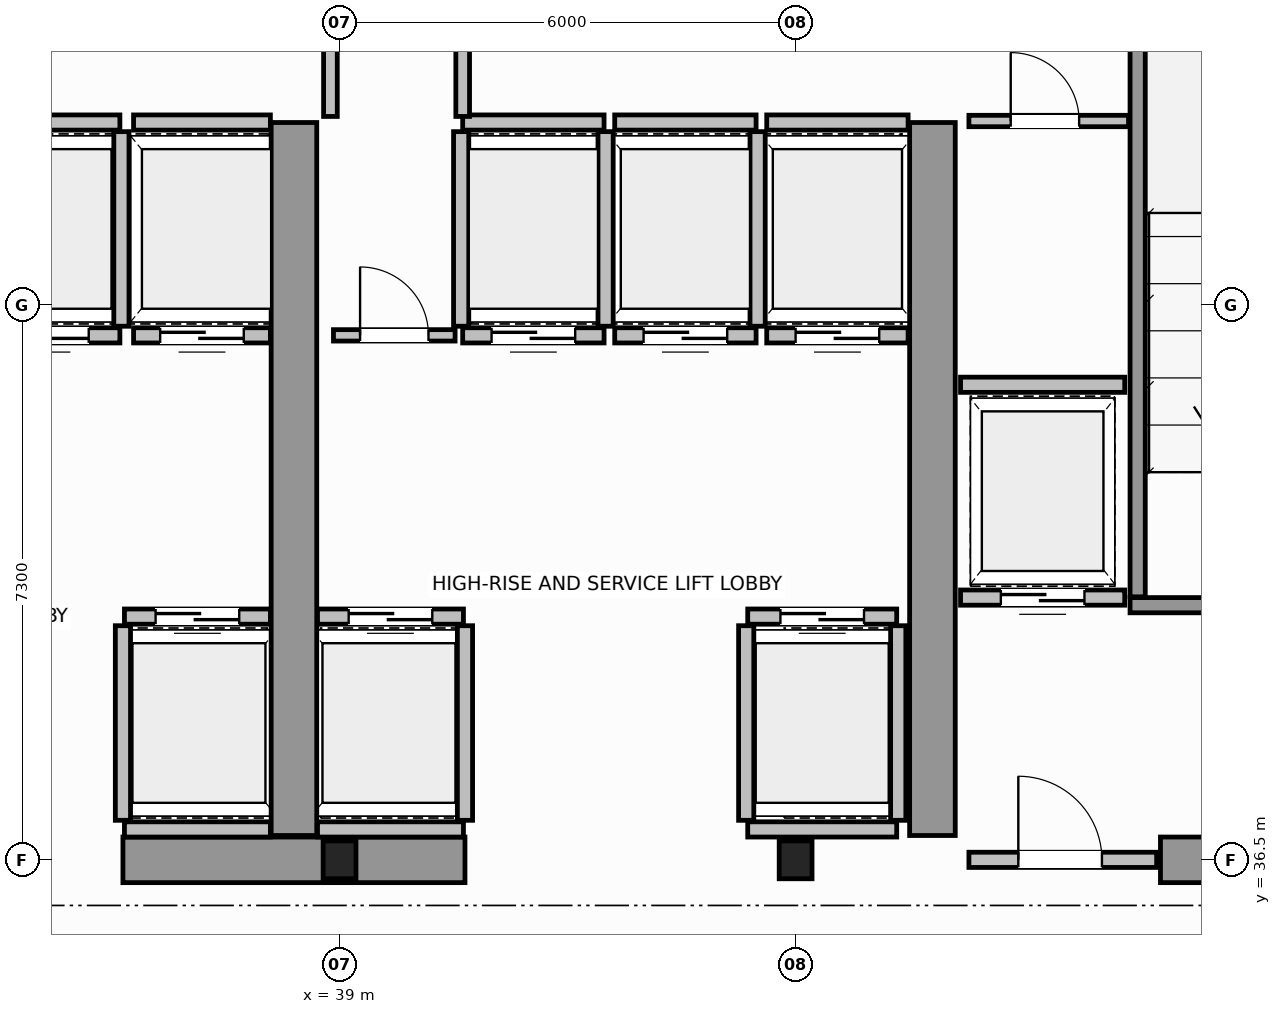
"""IFC4 building model, lengths in metres.
Left out: names, types, materials, properties, quantities, classifications, styles, units other than length and angle.
Written with IfcOpenShell. Run it as: python <this file> out.ifc"""

import sys

from ifc_helpers import new_model, si_unit, direction, frame, frame_2d, origin, origin_2d, place, context, subcontext, project, spatial, rectangle, i_section, extrude, source, transform, mapped, element, fill, save


model = new_model("IFC4")
c1 = context("Model", 3, precision=1e-05, world=origin(), true_north=direction((0.0, 1.0)))
c2 = subcontext(c1, "Body", "Model", "MODEL_VIEW")
j1 = project(units=[si_unit("LENGTHUNIT", "METRE"), si_unit("PLANEANGLEUNIT", "RADIAN")], contexts=[c1])
p1 = place(None, origin())
s1 = spatial("IfcSite", under=j1, at=p1, CompositionType="ELEMENT")
p2 = place(p1, origin())
s2 = spatial("IfcBuilding", under=s1, at=p2, CompositionType="ELEMENT")
p3 = place(p2, frame((0.0, 0.0, 199.4)))
s3 = spatial("IfcBuildingStorey", under=s2, at=p3, CompositionType="ELEMENT", Elevation=199.4)
m1 = source(origin(), c2, "Body", "SweptSolid", [
    extrude(i_section(OverallWidth=0.432, OverallDepth=0.498, WebThickness=0.055, FlangeThickness=0.068, FilletRadius=0.015, at=origin_2d()), origin(), (0.0, 0.0, 1.0), 3.8),
])
for number, where, z_axis, x_axis in (
    (1, (39.0, 36.5, 0.0), (0.0, 0.0, 1.0), (1.0, 0.0, 0.0)),
    (2, (45.0, 36.5, 0.0), (0.0, 0.0, 1.0), (1.0, 0.0, 0.0)),
):
    element("IfcColumn", number, at=place(p3, frame(where, z_axis=z_axis, x_axis=x_axis)), inside=s3, PredefinedType="COLUMN", context=c2, shape_type="MappedRepresentation", body=[
        mapped(m1, transform((0.0, 0.0, 0.0), scale=1.0)),
    ])
p4 = place(p3, frame((36.15, 36.5, 0.0), z_axis=(0.0, 0.0, 1.0), x_axis=(1.0, 0.0, 0.0)))
e3 = element("IfcWall", 3, at=p4, inside=s3, PredefinedType="SHEAR", context=c2, shape_type="SweptSolid", body=[
    extrude(rectangle(XDim=4.5, YDim=0.6, at=frame_2d((2.25, 0.0))), origin(), (0.0, 0.0, 1.0), 3.8),
])
p5 = place(p3, frame((49.8, 36.5, 0.0), z_axis=(0.0, 0.0, 1.0), x_axis=(1.0, 0.0, 0.0)))
e4 = element("IfcWall", 4, at=p5, inside=s3, PredefinedType="SHEAR", context=c2, shape_type="SweptSolid", body=[
    extrude(rectangle(XDim=3.88, YDim=0.6, at=frame_2d((1.94, 0.0))), origin(), (0.0, 0.0, 1.0), 2.58),
])
for number, where, z_axis, x_axis in (
    (5, (38.4, 36.82, 0.0), (0.0, 0.0, 1.0), (0.0, 1.0, 0.0)),
    (6, (46.8, 36.82, 0.0), (0.0, 0.0, 1.0), (0.0, 1.0, 0.0)),
):
    element("IfcWall", number, at=place(p3, frame(where, z_axis=z_axis, x_axis=x_axis)), inside=s3, PredefinedType="SHEAR", context=c2, shape_type="SweptSolid", body=[
        extrude(rectangle(XDim=9.38, YDim=0.6, at=frame_2d((4.69, 0.0))), origin(), (0.0, 0.0, 1.0), 3.8),
    ])
p6 = place(p3, frame((49.4, 39.85, 0.0), z_axis=(0.0, 0.0, 1.0), x_axis=(1.0, 0.0, 0.0)))
e7 = element("IfcWall", 7, at=p6, inside=s3, PredefinedType="SOLIDWALL", context=c2, shape_type="SweptSolid", body=[
    extrude(rectangle(XDim=4.3, YDim=0.2, at=frame_2d((2.15, 0.0))), origin(), (0.0, 0.0, 1.0), 3.8),
])
p7 = place(p6, frame((1.325, 0.0, 0.0)))
e8 = element("IfcOpeningElement", 8, at=p7, cuts=e7, PredefinedType="OPENING", context=c2, shape_type="SweptSolid", body=[
    extrude(rectangle(XDim=1.1, YDim=2.15, at=frame_2d((0.55, 1.075))), frame((0.0, 0.11, 0.0), z_axis=(0.0, -1.0, 0.0), x_axis=(1.0, 0.0, 0.0)), (0.0, 0.0, 1.0), 0.22),
])
p8 = place(p3, frame((49.5, 39.96, 0.0), z_axis=(0.0, 0.0, 1.0), x_axis=(0.0, 1.0, 0.0)))
e9 = element("IfcWall", 9, at=p8, inside=s3, PredefinedType="SOLIDWALL", context=c2, shape_type="SweptSolid", body=[
    extrude(rectangle(XDim=9.93, YDim=0.2, at=frame_2d((4.965, 0.0))), origin(), (0.0, 0.0, 1.0), 3.8),
])
p9 = place(p3, frame((47.28, 36.5, 0.0), z_axis=(0.0, 0.0, 1.0), x_axis=(1.0, 0.0, 0.0)))
e10 = element("IfcWall", 10, at=p9, inside=s3, PredefinedType="SOLIDWALL", context=c2, shape_type="SweptSolid", body=[
    extrude(rectangle(XDim=2.47, YDim=0.2, at=frame_2d((1.235, 0.0))), origin(), (0.0, 0.0, 1.0), 2.57),
])
p10 = place(p9, frame((0.65, 0.0, 0.0)))
e11 = element("IfcOpeningElement", 11, at=p10, cuts=e10, PredefinedType="OPENING", context=c2, shape_type="SweptSolid", body=[
    extrude(rectangle(XDim=1.1, YDim=2.15, at=frame_2d((0.55, 1.075))), frame((0.0, 0.11, 0.0), z_axis=(0.0, -1.0, 0.0), x_axis=(1.0, 0.0, 0.0)), (0.0, 0.0, 1.0), 0.22),
])
p11 = place(p3, frame((36.17, 39.7, 0.0), z_axis=(0.0, 0.0, 1.0), x_axis=(1.0, 0.0, 0.0)))
e12 = element("IfcWall", 12, at=p11, inside=s3, PredefinedType="SOLIDWALL", context=c2, shape_type="SweptSolid", body=[
    extrude(rectangle(XDim=1.92, YDim=0.2, at=frame_2d((0.96, 0.0))), origin(), (0.0, 0.0, 1.0), 3.58),
])
p12 = place(p11, frame((0.41, 0.0, 0.0)))
e13 = element("IfcOpeningElement", 13, at=p12, cuts=e12, PredefinedType="OPENING", context=c2, shape_type="SweptSolid", body=[
    extrude(rectangle(XDim=1.1, YDim=2.15, at=frame_2d((0.55, 1.075))), frame((0.0, 0.11, 0.0), z_axis=(0.0, -1.0, 0.0), x_axis=(1.0, 0.0, 0.0)), (0.0, 0.0, 1.0), 0.22),
])
p13 = place(p3, frame((36.17, 36.9, 0.0), z_axis=(0.0, 0.0, 1.0), x_axis=(1.0, 0.0, 0.0)))
e14 = element("IfcWall", 14, at=p13, inside=s3, PredefinedType="SOLIDWALL", context=c2, shape_type="SweptSolid", body=[
    extrude(rectangle(XDim=1.92, YDim=0.2, at=frame_2d((0.96, 0.0))), origin(), (0.0, 0.0, 1.0), 3.58),
])
p14 = place(p3, frame((36.15, 37.02, 0.0), z_axis=(0.0, 0.0, 1.0), x_axis=(0.0, 1.0, 0.0)))
e15 = element("IfcWall", 15, at=p14, inside=s3, PredefinedType="SOLIDWALL", context=c2, shape_type="SweptSolid", body=[
    extrude(rectangle(XDim=2.56, YDim=0.2, at=frame_2d((1.28, 0.0))), origin(), (0.0, 0.0, 1.0), 3.58),
])
p15 = place(p3, frame((34.19, 43.4, 0.0), z_axis=(0.0, 0.0, 1.0), x_axis=(1.0, 0.0, 0.0)))
e16 = element("IfcWall", 16, at=p15, inside=s3, PredefinedType="SOLIDWALL", context=c2, shape_type="SweptSolid", body=[
    extrude(rectangle(XDim=1.92, YDim=0.2, at=frame_2d((0.96, 0.0))), origin(), (0.0, 0.0, 1.0), 3.58),
])
p16 = place(p15, frame((0.41, 0.0, 0.0)))
e17 = element("IfcOpeningElement", 17, at=p16, cuts=e16, PredefinedType="OPENING", context=c2, shape_type="SweptSolid", body=[
    extrude(rectangle(XDim=1.1, YDim=2.15, at=frame_2d((0.55, 1.075))), frame((0.0, 0.11, 0.0), z_axis=(0.0, -1.0, 0.0), x_axis=(1.0, 0.0, 0.0)), (0.0, 0.0, 1.0), 0.22),
])
p17 = place(p3, frame((34.19, 46.2, 0.0), z_axis=(0.0, 0.0, 1.0), x_axis=(1.0, 0.0, 0.0)))
e18 = element("IfcWall", 18, at=p17, inside=s3, PredefinedType="SOLIDWALL", context=c2, shape_type="SweptSolid", body=[
    extrude(rectangle(XDim=1.92, YDim=0.2, at=frame_2d((0.96, 0.0))), origin(), (0.0, 0.0, 1.0), 3.58),
])
p18 = place(p3, frame((36.13, 43.52, 0.0), z_axis=(0.0, 0.0, 1.0), x_axis=(0.0, 1.0, 0.0)))
e19 = element("IfcWall", 19, at=p18, inside=s3, PredefinedType="SOLIDWALL", context=c2, shape_type="SweptSolid", body=[
    extrude(rectangle(XDim=2.56, YDim=0.2, at=frame_2d((1.28, 0.0))), origin(), (0.0, 0.0, 1.0), 3.58),
])
p19 = place(p3, frame((36.29, 43.4, 0.0), z_axis=(0.0, 0.0, 1.0), x_axis=(1.0, 0.0, 0.0)))
e20 = element("IfcWall", 20, at=p19, inside=s3, PredefinedType="SOLIDWALL", context=c2, shape_type="SweptSolid", body=[
    extrude(rectangle(XDim=1.8, YDim=0.2, at=frame_2d((0.9, 0.0))), origin(), (0.0, 0.0, 1.0), 3.58),
])
p20 = place(p19, frame((0.35, 0.0, 0.0)))
e21 = element("IfcOpeningElement", 21, at=p20, cuts=e20, PredefinedType="OPENING", context=c2, shape_type="SweptSolid", body=[
    extrude(rectangle(XDim=1.1, YDim=2.15, at=frame_2d((0.55, 1.075))), frame((0.0, 0.11, 0.0), z_axis=(0.0, -1.0, 0.0), x_axis=(1.0, 0.0, 0.0)), (0.0, 0.0, 1.0), 0.22),
])
p21 = place(p3, frame((36.29, 46.2, 0.0), z_axis=(0.0, 0.0, 1.0), x_axis=(1.0, 0.0, 0.0)))
e22 = element("IfcWall", 22, at=p21, inside=s3, PredefinedType="SOLIDWALL", context=c2, shape_type="SweptSolid", body=[
    extrude(rectangle(XDim=1.8, YDim=0.2, at=frame_2d((0.9, 0.0))), origin(), (0.0, 0.0, 1.0), 3.58),
])
p22 = place(p3, frame((38.71, 39.7, 0.0), z_axis=(0.0, 0.0, 1.0), x_axis=(1.0, 0.0, 0.0)))
e23 = element("IfcWall", 23, at=p22, inside=s3, PredefinedType="SOLIDWALL", context=c2, shape_type="SweptSolid", body=[
    extrude(rectangle(XDim=1.92, YDim=0.2, at=frame_2d((0.96, 0.0))), origin(), (0.0, 0.0, 1.0), 3.58),
])
p23 = place(p22, frame((0.41, 0.0, 0.0)))
e24 = element("IfcOpeningElement", 24, at=p23, cuts=e23, PredefinedType="OPENING", context=c2, shape_type="SweptSolid", body=[
    extrude(rectangle(XDim=1.1, YDim=2.15, at=frame_2d((0.55, 1.075))), frame((0.0, 0.11, 0.0), z_axis=(0.0, -1.0, 0.0), x_axis=(1.0, 0.0, 0.0)), (0.0, 0.0, 1.0), 0.22),
])
p24 = place(p3, frame((38.71, 36.9, 0.0), z_axis=(0.0, 0.0, 1.0), x_axis=(1.0, 0.0, 0.0)))
e25 = element("IfcWall", 25, at=p24, inside=s3, PredefinedType="SOLIDWALL", context=c2, shape_type="SweptSolid", body=[
    extrude(rectangle(XDim=1.92, YDim=0.2, at=frame_2d((0.96, 0.0))), origin(), (0.0, 0.0, 1.0), 3.58),
])
p25 = place(p3, frame((40.65, 37.02, 0.0), z_axis=(0.0, 0.0, 1.0), x_axis=(0.0, 1.0, 0.0)))
e26 = element("IfcWall", 26, at=p25, inside=s3, PredefinedType="SOLIDWALL", context=c2, shape_type="SweptSolid", body=[
    extrude(rectangle(XDim=2.56, YDim=0.2, at=frame_2d((1.28, 0.0))), origin(), (0.0, 0.0, 1.0), 3.58),
])
p26 = place(p3, frame((44.37, 39.7, 0.0), z_axis=(0.0, 0.0, 1.0), x_axis=(1.0, 0.0, 0.0)))
e27 = element("IfcWall", 27, at=p26, inside=s3, PredefinedType="SOLIDWALL", context=c2, shape_type="SweptSolid", body=[
    extrude(rectangle(XDim=1.96, YDim=0.2, at=frame_2d((0.98, 0.0))), origin(), (0.0, 0.0, 1.0), 3.58),
])
p27 = place(p26, frame((0.43, 0.0, 0.0)))
e28 = element("IfcOpeningElement", 28, at=p27, cuts=e27, PredefinedType="OPENING", context=c2, shape_type="SweptSolid", body=[
    extrude(rectangle(XDim=1.1, YDim=2.15, at=frame_2d((0.55, 1.075))), frame((0.0, 0.11, 0.0), z_axis=(0.0, -1.0, 0.0), x_axis=(1.0, 0.0, 0.0)), (0.0, 0.0, 1.0), 0.22),
])
p28 = place(p3, frame((44.37, 36.9, 0.0), z_axis=(0.0, 0.0, 1.0), x_axis=(1.0, 0.0, 0.0)))
e29 = element("IfcWall", 29, at=p28, inside=s3, PredefinedType="SOLIDWALL", context=c2, shape_type="SweptSolid", body=[
    extrude(rectangle(XDim=1.96, YDim=0.2, at=frame_2d((0.98, 0.0))), origin(), (0.0, 0.0, 1.0), 2.57),
])
for number, where, z_axis, x_axis in (
    (30, (44.35, 37.02, 0.0), (0.0, 0.0, 1.0), (0.0, 1.0, 0.0)),
    (31, (46.35, 37.02, 0.0), (0.0, 0.0, 1.0), (0.0, 1.0, 0.0)),
):
    element("IfcWall", number, at=place(p3, frame(where, z_axis=z_axis, x_axis=x_axis)), inside=s3, PredefinedType="SOLIDWALL", context=c2, shape_type="SweptSolid", body=[
        extrude(rectangle(XDim=2.56, YDim=0.2, at=frame_2d((1.28, 0.0))), origin(), (0.0, 0.0, 1.0), 3.58),
    ])
p29 = place(p3, frame((40.62, 43.4, 0.0), z_axis=(0.0, 0.0, 1.0), x_axis=(1.0, 0.0, 0.0)))
e32 = element("IfcWall", 32, at=p29, inside=s3, PredefinedType="SOLIDWALL", context=c2, shape_type="SweptSolid", body=[
    extrude(rectangle(XDim=1.86, YDim=0.2, at=frame_2d((0.93, 0.0))), origin(), (0.0, 0.0, 1.0), 3.58),
])
p30 = place(p29, frame((0.38, 0.0, 0.0)))
e33 = element("IfcOpeningElement", 33, at=p30, cuts=e32, PredefinedType="OPENING", context=c2, shape_type="SweptSolid", body=[
    extrude(rectangle(XDim=1.1, YDim=2.15, at=frame_2d((0.55, 1.075))), frame((0.0, 0.11, 0.0), z_axis=(0.0, -1.0, 0.0), x_axis=(1.0, 0.0, 0.0)), (0.0, 0.0, 1.0), 0.22),
])
p31 = place(p3, frame((40.62, 46.2, 0.0), z_axis=(0.0, 0.0, 1.0), x_axis=(1.0, 0.0, 0.0)))
e34 = element("IfcWall", 34, at=p31, inside=s3, PredefinedType="SOLIDWALL", context=c2, shape_type="SweptSolid", body=[
    extrude(rectangle(XDim=1.86, YDim=0.2, at=frame_2d((0.93, 0.0))), origin(), (0.0, 0.0, 1.0), 3.58),
])
for number, where, z_axis, x_axis in (
    (35, (40.6, 43.52, 0.0), (0.0, 0.0, 1.0), (0.0, 1.0, 0.0)),
    (36, (42.5, 43.52, 0.0), (0.0, 0.0, 1.0), (0.0, 1.0, 0.0)),
):
    element("IfcWall", number, at=place(p3, frame(where, z_axis=z_axis, x_axis=x_axis)), inside=s3, PredefinedType="SOLIDWALL", context=c2, shape_type="SweptSolid", body=[
        extrude(rectangle(XDim=2.56, YDim=0.2, at=frame_2d((1.28, 0.0))), origin(), (0.0, 0.0, 1.0), 3.58),
    ])
p32 = place(p3, frame((42.62, 43.4, 0.0), z_axis=(0.0, 0.0, 1.0), x_axis=(1.0, 0.0, 0.0)))
e37 = element("IfcWall", 37, at=p32, inside=s3, PredefinedType="SOLIDWALL", context=c2, shape_type="SweptSolid", body=[
    extrude(rectangle(XDim=1.86, YDim=0.2, at=frame_2d((0.93, 0.0))), origin(), (0.0, 0.0, 1.0), 3.58),
])
p33 = place(p32, frame((0.38, 0.0, 0.0)))
e38 = element("IfcOpeningElement", 38, at=p33, cuts=e37, PredefinedType="OPENING", context=c2, shape_type="SweptSolid", body=[
    extrude(rectangle(XDim=1.1, YDim=2.15, at=frame_2d((0.55, 1.075))), frame((0.0, 0.11, 0.0), z_axis=(0.0, -1.0, 0.0), x_axis=(1.0, 0.0, 0.0)), (0.0, 0.0, 1.0), 0.22),
])
p34 = place(p3, frame((42.62, 46.2, 0.0), z_axis=(0.0, 0.0, 1.0), x_axis=(1.0, 0.0, 0.0)))
e39 = element("IfcWall", 39, at=p34, inside=s3, PredefinedType="SOLIDWALL", context=c2, shape_type="SweptSolid", body=[
    extrude(rectangle(XDim=1.86, YDim=0.2, at=frame_2d((0.93, 0.0))), origin(), (0.0, 0.0, 1.0), 3.58),
])
p35 = place(p3, frame((44.5, 43.52, 0.0), z_axis=(0.0, 0.0, 1.0), x_axis=(0.0, 1.0, 0.0)))
e40 = element("IfcWall", 40, at=p35, inside=s3, PredefinedType="SOLIDWALL", context=c2, shape_type="SweptSolid", body=[
    extrude(rectangle(XDim=2.56, YDim=0.2, at=frame_2d((1.28, 0.0))), origin(), (0.0, 0.0, 1.0), 3.58),
])
p36 = place(p3, frame((44.62, 43.4, 0.0), z_axis=(0.0, 0.0, 1.0), x_axis=(1.0, 0.0, 0.0)))
e41 = element("IfcWall", 41, at=p36, inside=s3, PredefinedType="SOLIDWALL", context=c2, shape_type="SweptSolid", body=[
    extrude(rectangle(XDim=1.86, YDim=0.2, at=frame_2d((0.93, 0.0))), origin(), (0.0, 0.0, 1.0), 3.58),
])
p37 = place(p36, frame((0.38, 0.0, 0.0)))
e42 = element("IfcOpeningElement", 42, at=p37, cuts=e41, PredefinedType="OPENING", context=c2, shape_type="SweptSolid", body=[
    extrude(rectangle(XDim=1.1, YDim=2.15, at=frame_2d((0.55, 1.075))), frame((0.0, 0.11, 0.0), z_axis=(0.0, -1.0, 0.0), x_axis=(1.0, 0.0, 0.0)), (0.0, 0.0, 1.0), 0.22),
])
p38 = place(p3, frame((44.62, 46.2, 0.0), z_axis=(0.0, 0.0, 1.0), x_axis=(1.0, 0.0, 0.0)))
e43 = element("IfcWall", 43, at=p38, inside=s3, PredefinedType="SOLIDWALL", context=c2, shape_type="SweptSolid", body=[
    extrude(rectangle(XDim=1.86, YDim=0.2, at=frame_2d((0.93, 0.0))), origin(), (0.0, 0.0, 1.0), 3.58),
])
p39 = place(p3, frame((47.17, 39.95, 0.0), z_axis=(0.0, 0.0, 1.0), x_axis=(1.0, 0.0, 0.0)))
e44 = element("IfcWall", 44, at=p39, inside=s3, PredefinedType="SOLIDWALL", context=c2, shape_type="SweptSolid", body=[
    extrude(rectangle(XDim=2.16, YDim=0.2, at=frame_2d((1.08, 0.0))), origin(), (0.0, 0.0, 1.0), 3.58),
])
p40 = place(p39, frame((0.53, 0.0, 0.0)))
e45 = element("IfcOpeningElement", 45, at=p40, cuts=e44, PredefinedType="OPENING", context=c2, shape_type="SweptSolid", body=[
    extrude(rectangle(XDim=1.1, YDim=2.15, at=frame_2d((0.55, 1.075))), frame((0.0, 0.11, 0.0), z_axis=(0.0, -1.0, 0.0), x_axis=(1.0, 0.0, 0.0)), (0.0, 0.0, 1.0), 0.22),
])
p41 = place(p3, frame((47.17, 42.75, 0.0), z_axis=(0.0, 0.0, 1.0), x_axis=(1.0, 0.0, 0.0)))
e46 = element("IfcWall", 46, at=p41, inside=s3, PredefinedType="SOLIDWALL", context=c2, shape_type="SweptSolid", body=[
    extrude(rectangle(XDim=2.16, YDim=0.2, at=frame_2d((1.08, 0.0))), origin(), (0.0, 0.0, 1.0), 3.58),
])
p42 = place(p3, frame((47.28, 46.22, 0.0), z_axis=(0.0, 0.0, 1.0), x_axis=(1.0, 0.0, 0.0)))
e47 = element("IfcWall", 47, at=p42, inside=s3, PredefinedType="PARTITIONING", context=c2, shape_type="SweptSolid", body=[
    extrude(rectangle(XDim=2.1, YDim=0.15, at=frame_2d((1.05, 0.0))), origin(), (0.0, 0.0, 1.0), 3.58),
])
p43 = place(p42, frame((0.55, 0.0, 0.0)))
e48 = element("IfcOpeningElement", 48, at=p43, cuts=e47, PredefinedType="OPENING", context=c2, shape_type="SweptSolid", body=[
    extrude(rectangle(XDim=0.9, YDim=2.1, at=frame_2d((0.45, 1.05))), frame((0.0, 0.085, 0.0), z_axis=(0.0, -1.0, 0.0), x_axis=(1.0, 0.0, 0.0)), (0.0, 0.0, 1.0), 0.17),
])
p44 = place(p3, frame((38.92, 43.4, 0.0), z_axis=(0.0, 0.0, 1.0), x_axis=(1.0, 0.0, 0.0)))
e49 = element("IfcWall", 49, at=p44, inside=s3, PredefinedType="PARTITIONING", context=c2, shape_type="SweptSolid", body=[
    extrude(rectangle(XDim=1.6, YDim=0.15, at=frame_2d((0.8, 0.0))), origin(), (0.0, 0.0, 1.0), 3.58),
])
p45 = place(p44, frame((0.35, 0.0, 0.0)))
e50 = element("IfcOpeningElement", 50, at=p45, cuts=e49, PredefinedType="OPENING", context=c2, shape_type="SweptSolid", body=[
    extrude(rectangle(XDim=0.9, YDim=2.1, at=frame_2d((0.45, 1.05))), frame((0.0, 0.085, 0.0), z_axis=(0.0, -1.0, 0.0), x_axis=(1.0, 0.0, 0.0)), (0.0, 0.0, 1.0), 0.17),
])
p46 = place(p3, frame((38.88, 46.28, 0.0), z_axis=(0.0, 0.0, 1.0), x_axis=(0.0, 1.0, 0.0)))
e51 = element("IfcWall", 51, at=p46, inside=s3, PredefinedType="PLUMBINGWALL", context=c2, shape_type="SweptSolid", body=[
    extrude(rectangle(XDim=1.94, YDim=0.18, at=frame_2d((0.97, 0.0))), origin(), (0.0, 0.0, 1.0), 3.58),
])
p47 = place(p3, frame((40.62, 46.28, 0.0), z_axis=(0.0, 0.0, 1.0), x_axis=(0.0, 1.0, 0.0)))
e52 = element("IfcWall", 52, at=p47, inside=s3, PredefinedType="PLUMBINGWALL", context=c2, shape_type="SweptSolid", body=[
    extrude(rectangle(XDim=2.0, YDim=0.18, at=frame_2d((1.0, 0.0))), origin(), (0.0, 0.0, 1.0), 3.58),
])
m2 = source(origin(), c2, "Body", "SweptSolid", [
    extrude(rectangle(XDim=1.1, YDim=2.15, at=frame_2d((0.55, 1.075))), frame((0.0, 0.025, 0.0), z_axis=(0.0, -1.0, 0.0), x_axis=(1.0, 0.0, 0.0)), (0.0, 0.0, 1.0), 0.05),
])
p48 = place(p10, origin())
e53 = element("IfcDoor", 53, at=p48, inside=s3, OperationType="SINGLE_SWING_LEFT", PredefinedType="DOOR", context=c2, shape_type="MappedRepresentation", body=[
    mapped(m2, transform((0.0, 0.0, 0.0), scale=1.0)),
])
fill(e11, e53)
p49 = place(p12, origin())
e54 = element("IfcDoor", 54, at=p49, inside=s3, OperationType="DOUBLE_DOOR_SLIDING", PredefinedType="DOOR", context=c2, shape_type="MappedRepresentation", body=[
    mapped(m2, transform((0.0, 0.0, 0.0), scale=1.0)),
])
fill(e13, e54)
p50 = place(p16, origin())
e55 = element("IfcDoor", 55, at=p50, inside=s3, OperationType="DOUBLE_DOOR_SLIDING", PredefinedType="DOOR", context=c2, shape_type="MappedRepresentation", body=[
    mapped(m2, transform((0.0, 0.0, 0.0), scale=1.0)),
])
fill(e17, e55)
p51 = place(p20, origin())
e56 = element("IfcDoor", 56, at=p51, inside=s3, OperationType="DOUBLE_DOOR_SLIDING", PredefinedType="DOOR", context=c2, shape_type="MappedRepresentation", body=[
    mapped(m2, transform((0.0, 0.0, 0.0), scale=1.0)),
])
fill(e21, e56)
p52 = place(p23, origin())
e57 = element("IfcDoor", 57, at=p52, inside=s3, OperationType="DOUBLE_DOOR_SLIDING", PredefinedType="DOOR", context=c2, shape_type="MappedRepresentation", body=[
    mapped(m2, transform((0.0, 0.0, 0.0), scale=1.0)),
])
fill(e24, e57)
p53 = place(p27, origin())
e58 = element("IfcDoor", 58, at=p53, inside=s3, OperationType="DOUBLE_DOOR_SLIDING", PredefinedType="DOOR", context=c2, shape_type="MappedRepresentation", body=[
    mapped(m2, transform((0.0, 0.0, 0.0), scale=1.0)),
])
fill(e28, e58)
p54 = place(p30, origin())
e59 = element("IfcDoor", 59, at=p54, inside=s3, OperationType="DOUBLE_DOOR_SLIDING", PredefinedType="DOOR", context=c2, shape_type="MappedRepresentation", body=[
    mapped(m2, transform((0.0, 0.0, 0.0), scale=1.0)),
])
fill(e33, e59)
p55 = place(p33, origin())
e60 = element("IfcDoor", 60, at=p55, inside=s3, OperationType="DOUBLE_DOOR_SLIDING", PredefinedType="DOOR", context=c2, shape_type="MappedRepresentation", body=[
    mapped(m2, transform((0.0, 0.0, 0.0), scale=1.0)),
])
fill(e38, e60)
p56 = place(p37, origin())
e61 = element("IfcDoor", 61, at=p56, inside=s3, OperationType="DOUBLE_DOOR_SLIDING", PredefinedType="DOOR", context=c2, shape_type="MappedRepresentation", body=[
    mapped(m2, transform((0.0, 0.0, 0.0), scale=1.0)),
])
fill(e42, e61)
p57 = place(p40, origin())
e62 = element("IfcDoor", 62, at=p57, inside=s3, OperationType="DOUBLE_DOOR_SLIDING", PredefinedType="DOOR", context=c2, shape_type="MappedRepresentation", body=[
    mapped(m2, transform((0.0, 0.0, 0.0), scale=1.0)),
])
fill(e45, e62)
m3 = source(origin(), c2, "Body", "SweptSolid", [
    extrude(rectangle(XDim=0.9, YDim=2.1, at=frame_2d((0.45, 1.05))), frame((0.0, 0.025, 0.0), z_axis=(0.0, -1.0, 0.0), x_axis=(1.0, 0.0, 0.0)), (0.0, 0.0, 1.0), 0.05),
])
p58 = place(p43, origin())
e63 = element("IfcDoor", 63, at=p58, inside=s3, OperationType="SINGLE_SWING_RIGHT", PredefinedType="DOOR", context=c2, shape_type="MappedRepresentation", body=[
    mapped(m3, transform((0.0, 0.0, 0.0), scale=1.0)),
])
fill(e48, e63)
p59 = place(p45, origin())
e64 = element("IfcDoor", 64, at=p59, inside=s3, OperationType="SINGLE_SWING_LEFT", PredefinedType="DOOR", context=c2, shape_type="MappedRepresentation", body=[
    mapped(m3, transform((0.0, 0.0, 0.0), scale=1.0)),
])
fill(e50, e64)
save(model, sys.argv[1])
